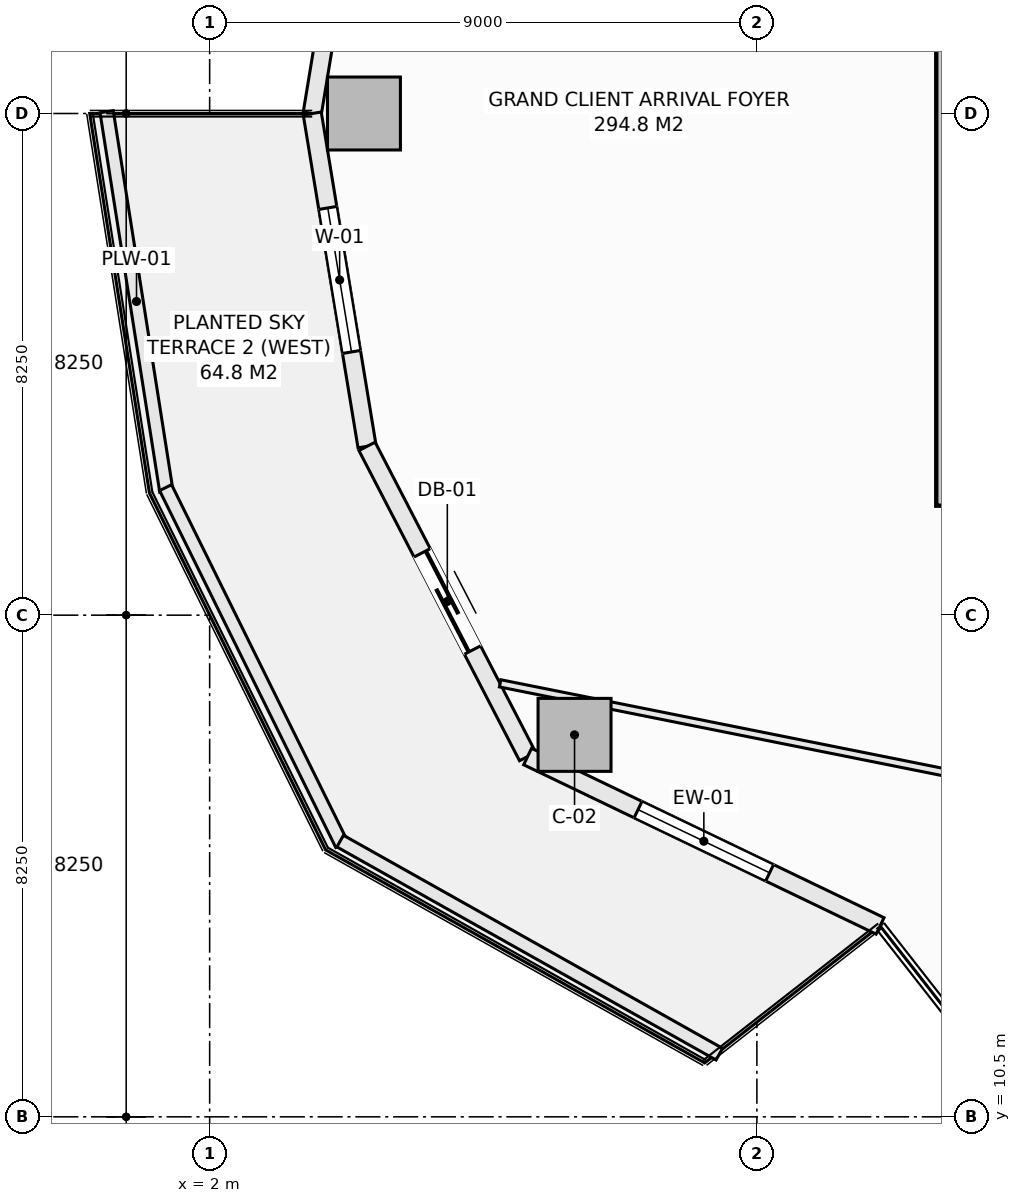
"""IFC4 building model, lengths in metres.
Left out: names, types, materials, properties, quantities, classifications, styles, units other than length and angle.
Written with IfcOpenShell. Run it as: python <this file> out.ifc"""

import sys

from ifc_helpers import new_model, si_unit, direction, frame, frame_2d, origin, origin_2d, place, context, subcontext, project, spatial, rectangle, extrude, element, fill, save


model = new_model("IFC4")
c1 = context("Model", 3, precision=1e-05, world=origin(), true_north=direction((0.0, 1.0)))
c2 = subcontext(c1, "Body", "Model", "MODEL_VIEW")
j1 = project(units=[si_unit("LENGTHUNIT", "METRE"), si_unit("PLANEANGLEUNIT", "RADIAN")], contexts=[c1])
p1 = place(None, origin())
s1 = spatial("IfcSite", under=j1, at=p1, CompositionType="ELEMENT")
p2 = place(p1, origin())
s2 = spatial("IfcBuilding", under=s1, at=p2, CompositionType="ELEMENT")
p3 = place(p2, frame((0.0, 0.0, 61.15)))
s3 = spatial("IfcBuildingStorey", under=s2, at=p3, CompositionType="ELEMENT", Elevation=61.15)
p4 = place(p3, frame((14.375, 20.55, -0.28), z_axis=(0.0, 0.0, 1.0), x_axis=(0.0, 1.0, 0.0)))
e1 = element("IfcWall", 1, at=p4, inside=s3, PredefinedType="SHEAR", context=c2, shape_type="SweptSolid", body=[
    extrude(rectangle(XDim=12.9, YDim=0.85, at=frame_2d((6.45, 0.0))), origin(), (0.0, 0.0, 1.0), 3.85),
])
for number, where, z_axis, x_axis in (
    (2, (4.538, 27.0, -0.28), (0.0, 0.0, 1.0), (1.0, 0.0, 0.0)),
    (3, (8.001, 16.781, -0.28), (0.0, 0.0, 1.0), (1.0, 0.0, 0.0)),
):
    element("IfcColumn", number, at=place(p3, frame(where, z_axis=z_axis, x_axis=x_axis)), inside=s3, PredefinedType="COLUMN", context=c2, shape_type="SweptSolid", body=[
        extrude(rectangle(XDim=1.2, YDim=1.2, at=origin_2d()), origin(), (0.0, 0.0, 1.0), 3.85),
    ])
p5 = place(p3, frame((3.688, 27.0, 0.0), z_axis=(0.0, 0.0, 1.0), x_axis=(0.162386212206, 0.986727276447, 0.0)))
e4 = element("IfcWall", 4, at=p5, inside=s3, PredefinedType="SOLIDWALL", context=c2, shape_type="SweptSolid", body=[
    extrude(rectangle(XDim=5.548, YDim=0.3, at=frame_2d((2.774, 0.0))), origin(), (0.0, 0.0, 1.0), 3.093),
])
p6 = place(p5, frame((1.574, 0.0, 0.85)))
e5 = element("IfcOpeningElement", 5, at=p6, cuts=e4, PredefinedType="OPENING", context=c2, shape_type="SweptSolid", body=[
    extrude(rectangle(XDim=2.4, YDim=1.9, at=frame_2d((1.2, 0.95))), frame((0.0, 0.16, 0.0), z_axis=(0.0, -1.0, 0.0), x_axis=(1.0, 0.0, 0.0)), (0.0, 0.0, 1.0), 0.32),
])
p7 = place(p3, frame((3.688, 27.0, 0.0), z_axis=(0.0, 0.0, 1.0), x_axis=(0.162386212206, -0.986727276447, 0.0)))
e6 = element("IfcWall", 6, at=p7, inside=s3, PredefinedType="SOLIDWALL", context=c2, shape_type="SweptSolid", body=[
    extrude(rectangle(XDim=5.548, YDim=0.3, at=frame_2d((2.774, 0.0))), origin(), (0.0, 0.0, 1.0), 3.093),
])
p8 = place(p7, frame((1.574, 0.0, 0.85)))
e7 = element("IfcOpeningElement", 7, at=p8, cuts=e6, PredefinedType="OPENING", context=c2, shape_type="SweptSolid", body=[
    extrude(rectangle(XDim=2.4, YDim=1.9, at=frame_2d((1.2, 0.95))), frame((0.0, 0.16, 0.0), z_axis=(0.0, -1.0, 0.0), x_axis=(1.0, 0.0, 0.0)), (0.0, 0.0, 1.0), 0.32),
])
p9 = place(p3, frame((4.588, 21.526, 0.0), z_axis=(0.0, 0.0, 1.0), x_axis=(0.459800981414, -0.888021991558, 0.0)))
e8 = element("IfcWall", 8, at=p9, inside=s3, PredefinedType="SOLIDWALL", context=c2, shape_type="SweptSolid", body=[
    extrude(rectangle(XDim=5.744, YDim=0.3, at=frame_2d((2.872, 0.0))), origin(), (0.0, 0.0, 1.0), 3.093),
])
p10 = place(p9, frame((1.972, 0.0, 0.0)))
e9 = element("IfcOpeningElement", 9, at=p10, cuts=e8, PredefinedType="OPENING", context=c2, shape_type="SweptSolid", body=[
    extrude(rectangle(XDim=1.8, YDim=2.25, at=frame_2d((0.9, 1.125))), frame((0.0, 0.16, 0.0), z_axis=(0.0, -1.0, 0.0), x_axis=(1.0, 0.0, 0.0)), (0.0, 0.0, 1.0), 0.32),
])
p11 = place(p3, frame((7.229, 16.425, 0.0), z_axis=(0.0, 0.0, 1.0), x_axis=(0.901354747727, -0.433081538224, 0.0)))
e10 = element("IfcWall", 10, at=p11, inside=s3, PredefinedType="SOLIDWALL", context=c2, shape_type="SweptSolid", body=[
    extrude(rectangle(XDim=6.431, YDim=0.3, at=frame_2d((3.215, 0.0))), origin(), (0.0, 0.0, 1.0), 3.093),
])
p12 = place(p11, frame((2.015, 0.0, 0.85)))
e11 = element("IfcOpeningElement", 11, at=p12, cuts=e10, PredefinedType="OPENING", context=c2, shape_type="SweptSolid", body=[
    extrude(rectangle(XDim=2.4, YDim=1.9, at=frame_2d((1.2, 0.95))), frame((0.0, 0.16, 0.0), z_axis=(0.0, -1.0, 0.0), x_axis=(1.0, 0.0, 0.0)), (0.0, 0.0, 1.0), 0.32),
])
p13 = place(p3, frame((0.306, 27.029, 0.0), z_axis=(0.0, 0.0, 1.0), x_axis=(0.15545655238, -0.987842730561, 0.0)))
e12 = element("IfcWall", 12, at=p13, inside=s3, PredefinedType="PARAPET", context=c2, shape_type="SweptSolid", body=[
    extrude(rectangle(XDim=6.318, YDim=0.22, at=frame_2d((3.159, 0.0))), origin(), (0.0, 0.0, 1.0), 0.52),
])
p14 = place(p3, frame((1.275, 20.847, 0.0), z_axis=(0.0, 0.0, 1.0), x_axis=(0.442686636348, -0.89667638644, 0.0)))
e13 = element("IfcWall", 13, at=p14, inside=s3, PredefinedType="PARAPET", context=c2, shape_type="SweptSolid", body=[
    extrude(rectangle(XDim=6.545, YDim=0.22, at=frame_2d((3.272, 0.0))), origin(), (0.0, 0.0, 1.0), 0.52),
])
p15 = place(p3, frame((4.147, 15.034, 0.0), z_axis=(0.0, 0.0, 1.0), x_axis=(0.871775109335, -0.489906275468, 0.0)))
e14 = element("IfcWall", 14, at=p15, inside=s3, PredefinedType="PARAPET", context=c2, shape_type="SweptSolid", body=[
    extrude(rectangle(XDim=7.152, YDim=0.22, at=frame_2d((3.576, 0.0))), origin(), (0.0, 0.0, 1.0), 0.52),
])
p16 = place(p3, frame((6.777, 17.629, 0.0), z_axis=(0.0, 0.0, 1.0), x_axis=(0.980522111168, -0.19640873074, 0.0)))
e15 = element("IfcWall", 15, at=p16, inside=s3, PredefinedType="PARTITIONING", context=c2, shape_type="SweptSolid", body=[
    extrude(rectangle(XDim=20.699, YDim=0.12, at=frame_2d((10.349, 0.0))), origin(), (0.0, 0.0, 1.0), 3.205),
])
p17 = place(p8, origin())
e16 = element("IfcWindow", 16, at=p17, inside=s3, PartitioningType="SINGLE_PANEL", PredefinedType="WINDOW", context=c2, shape_type="SweptSolid", body=[
    extrude(rectangle(XDim=2.4, YDim=1.9, at=frame_2d((1.2, 0.95))), frame((0.0, 0.03, 0.0), z_axis=(0.0, -1.0, 0.0), x_axis=(1.0, 0.0, 0.0)), (0.0, 0.0, 1.0), 0.06),
])
fill(e7, e16)
p18 = place(p10, frame((1.8, 0.0, 0.0), z_axis=(0.0, 0.0, 1.0), x_axis=(-1.0, 0.0, 0.0)))
e17 = element("IfcDoor", 17, at=p18, inside=s3, OperationType="SLIDING_TO_LEFT", PredefinedType="DOOR", context=c2, shape_type="SweptSolid", body=[
    extrude(rectangle(XDim=1.8, YDim=2.25, at=frame_2d((0.9, 1.125))), frame((0.0, 0.025, 0.0), z_axis=(0.0, -1.0, 0.0), x_axis=(1.0, 0.0, 0.0)), (0.0, 0.0, 1.0), 0.05),
])
fill(e9, e17)
p19 = place(p12, origin())
e18 = element("IfcWindow", 18, at=p19, inside=s3, PartitioningType="SINGLE_PANEL", PredefinedType="WINDOW", context=c2, shape_type="SweptSolid", body=[
    extrude(rectangle(XDim=2.4, YDim=1.9, at=frame_2d((1.2, 0.95))), frame((0.0, 0.03, 0.0), z_axis=(0.0, -1.0, 0.0), x_axis=(1.0, 0.0, 0.0)), (0.0, 0.0, 1.0), 0.06),
])
fill(e11, e18)
save(model, sys.argv[1])
